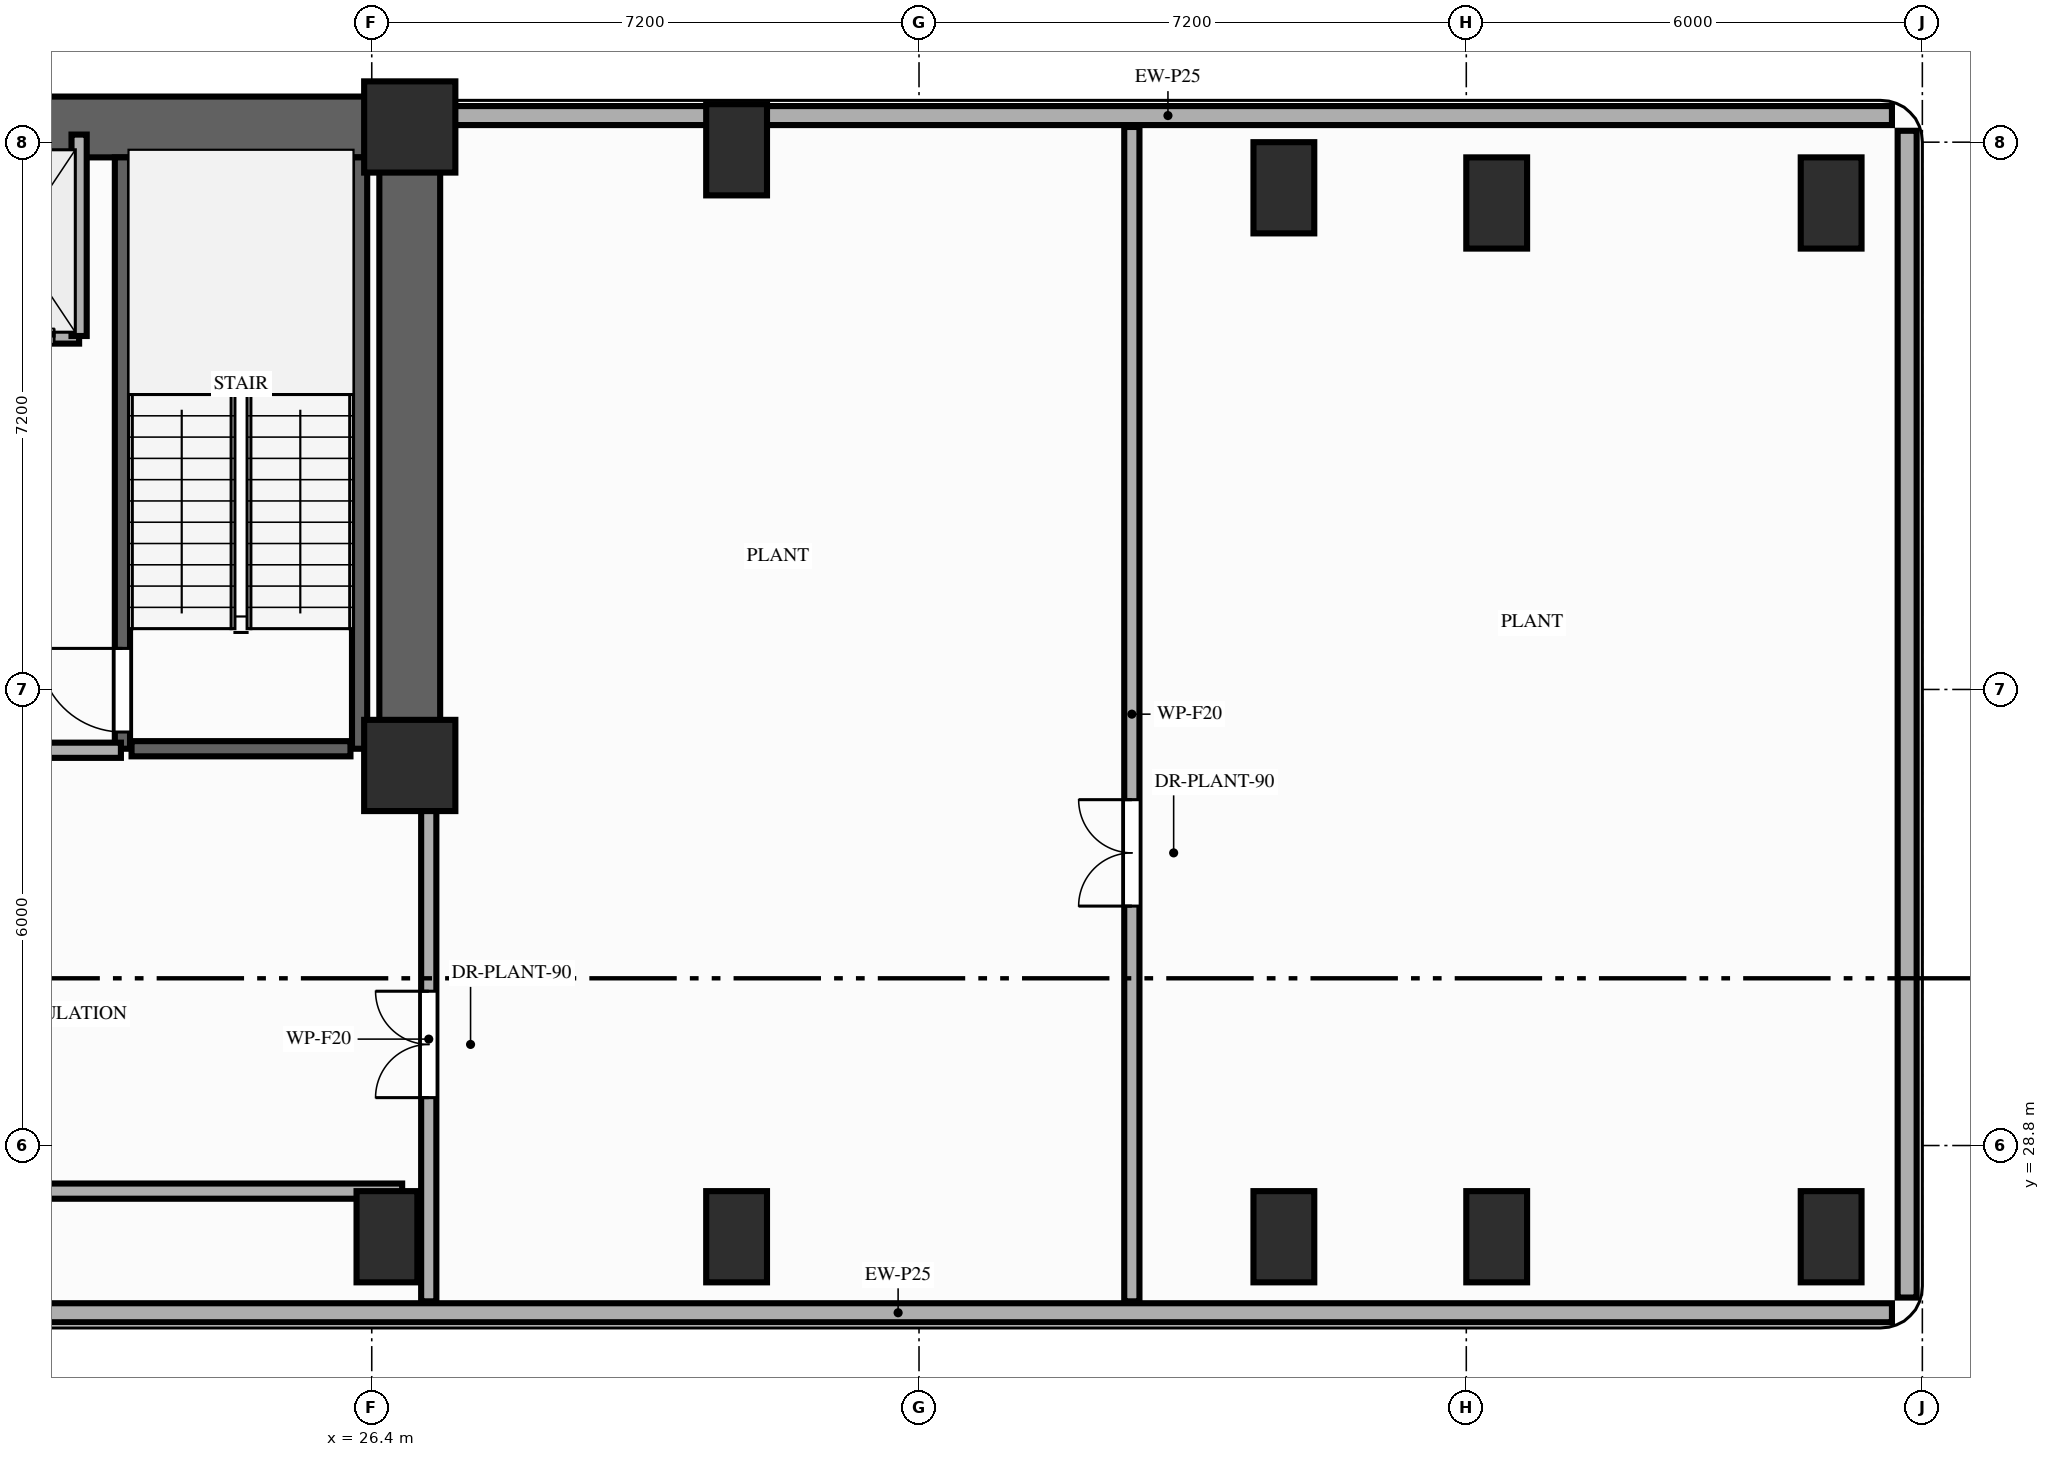
"""IFC4 building model, lengths in metres.
Left out: names, types, materials, properties, quantities, classifications, styles, units other than length and angle.
Written with IfcOpenShell. Run it as: python <this file> out.ifc"""

import sys

from ifc_helpers import new_model, si_unit, direction, frame, frame_2d, origin, origin_2d, place, context, subcontext, project, spatial, rectangle, extrude, element, fill, save


model = new_model("IFC4")
c1 = context("Model", 3, precision=1e-05, world=origin(), true_north=direction((0.0, 1.0)))
c2 = subcontext(c1, "Body", "Model", "MODEL_VIEW")
j1 = project(units=[si_unit("LENGTHUNIT", "METRE"), si_unit("PLANEANGLEUNIT", "RADIAN")], contexts=[c1])
p1 = place(None, origin())
s1 = spatial("IfcSite", under=j1, at=p1, CompositionType="ELEMENT")
p2 = place(p1, origin())
s2 = spatial("IfcBuilding", under=s1, at=p2, CompositionType="ELEMENT")
p3 = place(p2, frame((0.0, 0.0, 79.4)))
s3 = spatial("IfcBuildingStorey", under=s2, at=p3, CompositionType="ELEMENT", Elevation=79.4)
for number, where, z_axis, x_axis in (
    (1, (26.9, 33.8, 0.0), (0.0, 0.0, 1.0), (1.0, 0.0, 0.0)),
    (2, (26.9, 42.2, 0.0), (0.0, 0.0, 1.0), (1.0, 0.0, 0.0)),
):
    element("IfcColumn", number, at=place(p3, frame(where, z_axis=z_axis, x_axis=x_axis)), inside=s3, PredefinedType="COLUMN", context=c2, shape_type="SweptSolid", body=[
        extrude(rectangle(XDim=1.2, YDim=1.2, at=origin_2d()), origin(), (0.0, 0.0, 1.0), 4.0),
    ])
for number, where, z_axis, x_axis in (
    (3, (26.6, 27.6, 0.0), (0.0, 0.0, 1.0), (1.0, 0.0, 0.0)),
    (4, (31.2, 27.6, 0.0), (0.0, 0.0, 1.0), (1.0, 0.0, 0.0)),
    (5, (31.2, 41.9, 0.0), (0.0, 0.0, 1.0), (1.0, 0.0, 0.0)),
    (6, (38.4, 27.6, 0.0), (0.0, 0.0, 1.0), (1.0, 0.0, 0.0)),
    (7, (38.4, 41.4, 0.0), (0.0, 0.0, 1.0), (1.0, 0.0, 0.0)),
    (8, (41.2, 27.6, 0.0), (0.0, 0.0, 1.0), (1.0, 0.0, 0.0)),
    (9, (41.2, 41.2, 0.0), (0.0, 0.0, 1.0), (1.0, 0.0, 0.0)),
    (10, (45.6, 27.6, 0.0), (0.0, 0.0, 1.0), (1.0, 0.0, 0.0)),
    (11, (45.6, 41.2, 0.0), (0.0, 0.0, 1.0), (1.0, 0.0, 0.0)),
):
    element("IfcColumn", number, at=place(p3, frame(where, z_axis=z_axis, x_axis=x_axis)), inside=s3, PredefinedType="COLUMN", context=c2, shape_type="SweptSolid", body=[
        extrude(rectangle(XDim=0.8, YDim=1.2, at=origin_2d()), origin(), (0.0, 0.0, 1.0), 4.0),
    ])
p4 = place(p3, frame((46.4, 42.35, 0.0), z_axis=(0.0, 0.0, 1.0), x_axis=(-1.0, 0.0, 0.0)))
e12 = element("IfcWall", 12, at=p4, inside=s3, PredefinedType="STANDARD", context=c2, shape_type="SweptSolid", body=[
    extrude(rectangle(XDim=19.05, YDim=0.25, at=frame_2d((9.525, 0.0))), origin(), (0.0, 0.0, 1.0), 3.21),
])
p5 = place(p3, frame((20.25, 26.6, 0.0), z_axis=(0.0, 0.0, 1.0), x_axis=(1.0, 0.0, 0.0)))
e13 = element("IfcWall", 13, at=p5, inside=s3, PredefinedType="STANDARD", context=c2, shape_type="SweptSolid", body=[
    extrude(rectangle(XDim=26.15, YDim=0.25, at=frame_2d((13.075, 0.0))), origin(), (0.0, 0.0, 1.0), 3.51),
])
p6 = place(p3, frame((46.6, 26.8, 0.0), z_axis=(0.0, 0.0, 1.0), x_axis=(0.0, 1.0, 0.0)))
e14 = element("IfcWall", 14, at=p6, inside=s3, PredefinedType="STANDARD", context=c2, shape_type="SweptSolid", body=[
    extrude(rectangle(XDim=15.35, YDim=0.25, at=frame_2d((7.675, 0.0))), origin(), (0.0, 0.0, 1.0), 3.82),
])
p7 = place(p3, frame((6.45, 42.2, 0.0), z_axis=(0.0, 0.0, 1.0), x_axis=(1.0, 0.0, 0.0)))
e15 = element("IfcWall", 15, at=p7, inside=s3, PredefinedType="SHEAR", context=c2, shape_type="SweptSolid", body=[
    extrude(rectangle(XDim=20.45, YDim=0.8, at=frame_2d((10.225, 0.0))), origin(), (0.0, 0.0, 1.0), 3.82),
])
p8 = place(p3, frame((26.9, 33.8, 0.0), z_axis=(0.0, 0.0, 1.0), x_axis=(0.0, 1.0, 0.0)))
e16 = element("IfcWall", 16, at=p8, inside=s3, PredefinedType="SHEAR", context=c2, shape_type="SweptSolid", body=[
    extrude(rectangle(XDim=7.95, YDim=0.8, at=frame_2d((3.975, 0.0))), origin(), (0.0, 0.0, 1.0), 3.82),
])
p9 = place(p3, frame((23.12, 34.02, 0.0), z_axis=(0.0, 0.0, 1.0), x_axis=(0.0, 1.0, 0.0)))
e17 = element("IfcWall", 17, at=p9, inside=s3, PredefinedType="SHEAR", context=c2, shape_type="SweptSolid", body=[
    extrude(rectangle(XDim=7.78, YDim=0.2, at=frame_2d((3.89, 0.0))), origin(), (0.0, 0.0, 1.0), 3.82),
])
p10 = place(p9, frame((0.22, 0.0, 0.0)))
e18 = element("IfcOpeningElement", 18, at=p10, cuts=e17, PredefinedType="OPENING", context=c2, shape_type="SweptSolid", body=[
    extrude(rectangle(XDim=1.1, YDim=2.15, at=frame_2d((0.55, 1.075))), frame((0.0, 0.11, 0.0), z_axis=(0.0, -1.0, 0.0), x_axis=(1.0, 0.0, 0.0)), (0.0, 0.0, 1.0), 0.22),
])
p11 = place(p3, frame((26.24, 34.02, 0.0), z_axis=(0.0, 0.0, 1.0), x_axis=(0.0, 1.0, 0.0)))
e19 = element("IfcWall", 19, at=p11, inside=s3, PredefinedType="SHEAR", context=c2, shape_type="SweptSolid", body=[
    extrude(rectangle(XDim=7.78, YDim=0.2, at=frame_2d((3.89, 0.0))), origin(), (0.0, 0.0, 1.0), 3.82),
])
p12 = place(p3, frame((23.24, 34.02, 0.0), z_axis=(0.0, 0.0, 1.0), x_axis=(1.0, 0.0, 0.0)))
e20 = element("IfcWall", 20, at=p12, inside=s3, PredefinedType="SHEAR", context=c2, shape_type="SweptSolid", body=[
    extrude(rectangle(XDim=2.88, YDim=0.2, at=frame_2d((1.44, 0.0))), origin(), (0.0, 0.0, 1.0), 3.82),
])
p13 = place(p3, frame((20.85, 39.45, 0.0), z_axis=(0.0, 0.0, 1.0), x_axis=(1.0, 0.0, 0.0)))
e21 = element("IfcWall", 21, at=p13, inside=s3, PredefinedType="MOVABLE", context=c2, shape_type="SweptSolid", body=[
    extrude(rectangle(XDim=1.7, YDim=0.2, at=frame_2d((0.85, 0.0))), origin(), (0.0, 0.0, 1.0), 3.82),
])
p14 = place(p13, frame((0.32, 0.0, 0.0)))
e22 = element("IfcOpeningElement", 22, at=p14, cuts=e21, PredefinedType="OPENING", context=c2, shape_type="SweptSolid", body=[
    extrude(rectangle(XDim=1.05, YDim=2.15, at=frame_2d((0.525, 1.075))), frame((0.0, 0.11, 0.0), z_axis=(0.0, -1.0, 0.0), x_axis=(1.0, 0.0, 0.0)), (0.0, 0.0, 1.0), 0.22),
])
p15 = place(p3, frame((22.55, 39.45, 0.0), z_axis=(0.0, 0.0, 1.0), x_axis=(0.0, 1.0, 0.0)))
e23 = element("IfcWall", 23, at=p15, inside=s3, PredefinedType="MOVABLE", context=c2, shape_type="SweptSolid", body=[
    extrude(rectangle(XDim=2.65, YDim=0.2, at=frame_2d((1.325, 0.0))), origin(), (0.0, 0.0, 1.0), 3.21),
])
p16 = place(p3, frame((20.5, 34.0, 0.0), z_axis=(0.0, 0.0, 1.0), x_axis=(1.0, 0.0, 0.0)))
e24 = element("IfcWall", 24, at=p16, inside=s3, PredefinedType="PARTITIONING", context=c2, shape_type="SweptSolid", body=[
    extrude(rectangle(XDim=2.6, YDim=0.2, at=frame_2d((1.3, 0.0))), origin(), (0.0, 0.0, 1.0), 3.21),
])
p17 = place(p3, frame((12.75, 28.2, 0.0), z_axis=(0.0, 0.0, 1.0), x_axis=(1.0, 0.0, 0.0)))
e25 = element("IfcWall", 25, at=p17, inside=s3, PredefinedType="PARTITIONING", context=c2, shape_type="SweptSolid", body=[
    extrude(rectangle(XDim=14.05, YDim=0.2, at=frame_2d((7.025, 0.0))), origin(), (0.0, 0.0, 1.0), 3.21),
])
p18 = place(p17, frame((3.2, 0.0, 0.0)))
e26 = element("IfcOpeningElement", 26, at=p18, cuts=e25, PredefinedType="OPENING", context=c2, shape_type="SweptSolid", body=[
    extrude(rectangle(XDim=1.1, YDim=2.15, at=frame_2d((0.55, 1.075))), frame((0.0, 0.11, 0.0), z_axis=(0.0, -1.0, 0.0), x_axis=(1.0, 0.0, 0.0)), (0.0, 0.0, 1.0), 0.22),
])
p19 = place(p3, frame((27.15, 26.75, 0.0), z_axis=(0.0, 0.0, 1.0), x_axis=(0.0, 1.0, 0.0)))
e27 = element("IfcWall", 27, at=p19, inside=s3, PredefinedType="PARTITIONING", context=c2, shape_type="SweptSolid", body=[
    extrude(rectangle(XDim=6.9, YDim=0.2, at=frame_2d((3.45, 0.0))), origin(), (0.0, 0.0, 1.0), 3.21),
])
p20 = place(p19, frame((2.68, 0.0, 0.0)))
e28 = element("IfcOpeningElement", 28, at=p20, cuts=e27, PredefinedType="OPENING", context=c2, shape_type="SweptSolid", body=[
    extrude(rectangle(XDim=1.4, YDim=2.2, at=frame_2d((0.7, 1.1))), frame((0.0, 0.11, 0.0), z_axis=(0.0, -1.0, 0.0), x_axis=(1.0, 0.0, 0.0)), (0.0, 0.0, 1.0), 0.22),
])
p21 = place(p3, frame((36.4, 26.75, 0.0), z_axis=(0.0, 0.0, 1.0), x_axis=(0.0, 1.0, 0.0)))
e29 = element("IfcWall", 29, at=p21, inside=s3, PredefinedType="PARTITIONING", context=c2, shape_type="SweptSolid", body=[
    extrude(rectangle(XDim=15.45, YDim=0.2, at=frame_2d((7.725, 0.0))), origin(), (0.0, 0.0, 1.0), 3.21),
])
p22 = place(p21, frame((5.2, 0.0, 0.0)))
e30 = element("IfcOpeningElement", 30, at=p22, cuts=e29, PredefinedType="OPENING", context=c2, shape_type="SweptSolid", body=[
    extrude(rectangle(XDim=1.4, YDim=2.2, at=frame_2d((0.7, 1.1))), frame((0.0, 0.11, 0.0), z_axis=(0.0, -1.0, 0.0), x_axis=(1.0, 0.0, 0.0)), (0.0, 0.0, 1.0), 0.22),
])
p23 = place(p10, origin())
e31 = element("IfcDoor", 31, at=p23, inside=s3, OperationType="SINGLE_SWING_RIGHT", PredefinedType="DOOR", context=c2, shape_type="SweptSolid", body=[
    extrude(rectangle(XDim=1.1, YDim=2.15, at=frame_2d((0.55, 1.075))), frame((0.0, 0.025, 0.0), z_axis=(0.0, -1.0, 0.0), x_axis=(1.0, 0.0, 0.0)), (0.0, 0.0, 1.0), 0.05),
])
fill(e18, e31)
p24 = place(p14, origin())
e32 = element("IfcDoor", 32, at=p24, inside=s3, OperationType="SLIDING_TO_LEFT", PredefinedType="DOOR", context=c2, shape_type="SweptSolid", body=[
    extrude(rectangle(XDim=1.05, YDim=2.15, at=frame_2d((0.525, 1.075))), frame((0.0, 0.025, 0.0), z_axis=(0.0, -1.0, 0.0), x_axis=(1.0, 0.0, 0.0)), (0.0, 0.0, 1.0), 0.05),
])
fill(e22, e32)
p25 = place(p20, origin())
e33 = element("IfcDoor", 33, at=p25, inside=s3, OperationType="DOUBLE_DOOR_SINGLE_SWING", PredefinedType="DOOR", context=c2, shape_type="SweptSolid", body=[
    extrude(rectangle(XDim=1.4, YDim=2.2, at=frame_2d((0.7, 1.1))), frame((0.0, 0.025, 0.0), z_axis=(0.0, -1.0, 0.0), x_axis=(1.0, 0.0, 0.0)), (0.0, 0.0, 1.0), 0.05),
])
fill(e28, e33)
p26 = place(p22, origin())
e34 = element("IfcDoor", 34, at=p26, inside=s3, OperationType="DOUBLE_DOOR_SINGLE_SWING", PredefinedType="DOOR", context=c2, shape_type="SweptSolid", body=[
    extrude(rectangle(XDim=1.4, YDim=2.2, at=frame_2d((0.7, 1.1))), frame((0.0, 0.025, 0.0), z_axis=(0.0, -1.0, 0.0), x_axis=(1.0, 0.0, 0.0)), (0.0, 0.0, 1.0), 0.05),
])
fill(e30, e34)
save(model, sys.argv[1])
